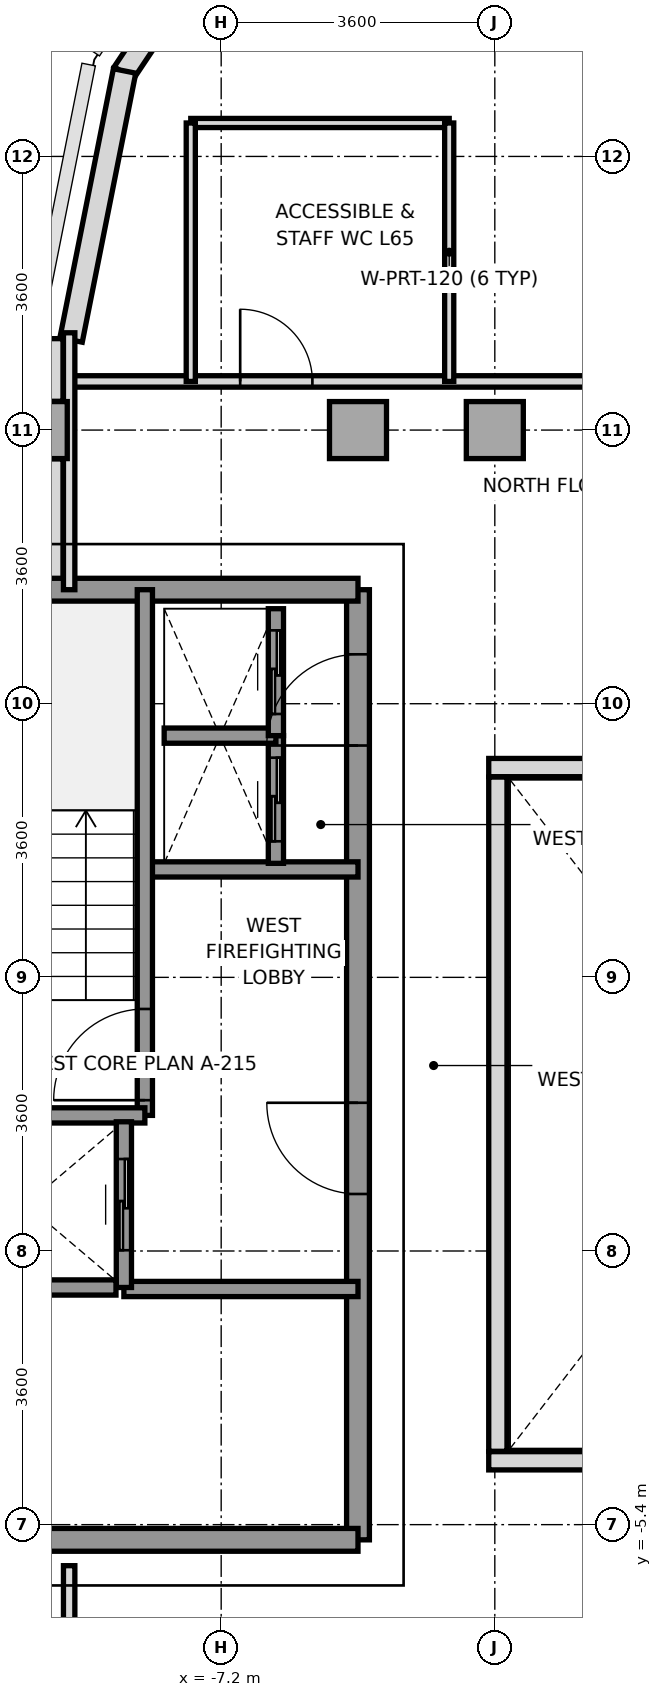
"""IFC4 building model, lengths in metres.
Left out: names, types, materials, properties, quantities, classifications, styles, units other than length and angle.
Written with IfcOpenShell. Run it as: python <this file> out.ifc"""

import sys

from ifc_helpers import new_model, si_unit, direction, frame, frame_2d, origin, origin_2d, place, context, subcontext, project, spatial, rectangle, extrude, source, transform, mapped, element, fill, save


model = new_model("IFC4")
c1 = context("Model", 3, precision=1e-05, world=origin(), true_north=direction((0.0, 1.0)))
c2 = subcontext(c1, "Body", "Model", "MODEL_VIEW")
j1 = project(units=[si_unit("LENGTHUNIT", "METRE"), si_unit("PLANEANGLEUNIT", "RADIAN")], contexts=[c1])
p1 = place(None, origin())
s1 = spatial("IfcSite", under=j1, at=p1, CompositionType="ELEMENT")
p2 = place(p1, origin())
s2 = spatial("IfcBuilding", under=s1, at=p2, CompositionType="ELEMENT")
p3 = place(p2, frame((0.0, 0.0, 236.4)))
s3 = spatial("IfcBuildingStorey", under=s2, at=p3, CompositionType="ELEMENT", Elevation=236.4)
m1 = source(origin(), c2, "Body", "SweptSolid", [
    extrude(rectangle(XDim=0.75, YDim=0.75, at=origin_2d()), origin(), (0.0, 0.0, 1.0), 3.01),
])
for number, where, z_axis, x_axis in (
    (1, (-9.6, 9.0, 0.0), (0.0, 0.0, 1.0), (1.0, 0.0, 0.0)),
    (2, (-5.4, 9.0, 0.0), (0.0, 0.0, 1.0), (1.0, 0.0, 0.0)),
    (3, (-3.6, 9.0, 0.0), (0.0, 0.0, 1.0), (1.0, 0.0, 0.0)),
):
    element("IfcColumn", number, at=place(p3, frame(where, z_axis=z_axis, x_axis=x_axis)), inside=s3, PredefinedType="COLUMN", context=c2, shape_type="MappedRepresentation", body=[
        mapped(m1, transform((0.0, 0.0, 0.0), x_axis=(1.0, 0.0, 0.0), y_axis=(0.0, 1.0, 0.0), z_axis=(0.0, 0.0, 1.0), scale=1.0)),
    ])
p4 = place(p3, frame((-7.305, 15.458, 0.0), z_axis=(0.0, 0.0, 1.0), x_axis=(-0.555604299396, -0.831446848868, 0.0)))
e4 = element("IfcWall", 4, at=p4, inside=s3, PredefinedType="SOLIDWALL", context=c2, shape_type="SweptSolid", body=[
    extrude(rectangle(XDim=2.118, YDim=0.3, at=frame_2d((1.059, 0.0))), origin(), (0.0, 0.0, 1.0), 2.61),
])
p5 = place(p3, frame((-8.471, 13.725, 0.0), z_axis=(0.0, 0.0, 1.0), x_axis=(-0.195114232679, -0.980780523974, 0.0)))
e5 = element("IfcWall", 5, at=p5, inside=s3, PredefinedType="SOLIDWALL", context=c2, shape_type="SweptSolid", body=[
    extrude(rectangle(XDim=3.609, YDim=0.3, at=frame_2d((1.804, 0.0))), origin(), (0.0, 0.0, 1.0), 3.01),
])
p6 = place(p3, frame((-9.4, 6.953, 0.0), z_axis=(0.0, 0.0, 1.0), x_axis=(0.0, 1.0, 0.0)))
e6 = element("IfcWall", 6, at=p6, inside=s3, PredefinedType="PARAPET", context=c2, shape_type="SweptSolid", body=[
    extrude(rectangle(XDim=1.669, YDim=0.24, at=frame_2d((0.834, 0.0))), origin(), (0.0, 0.0, 1.0), 1.15),
])
p7 = place(p3, frame((-9.4, 9.378, 0.0), z_axis=(0.0, 0.0, 1.0), x_axis=(0.0, 1.0, 0.0)))
e7 = element("IfcWall", 7, at=p7, inside=s3, PredefinedType="PARAPET", context=c2, shape_type="SweptSolid", body=[
    extrude(rectangle(XDim=0.825, YDim=0.24, at=frame_2d((0.413, 0.0))), origin(), (0.0, 0.0, 1.0), 1.15),
])
p8 = place(p3, frame((-5.4, -5.6, 0.0), z_axis=(0.0, 0.0, 1.0), x_axis=(0.0, 1.0, 0.0)))
e8 = element("IfcWall", 8, at=p8, inside=s3, PredefinedType="SHEAR", context=c2, shape_type="SweptSolid", body=[
    extrude(rectangle(XDim=12.5, YDim=0.3, at=frame_2d((6.25, 0.0))), origin(), (0.0, 0.0, 1.0), 3.01),
])
p9 = place(p8, frame((4.55, 0.0, 0.0)))
e9 = element("IfcOpeningElement", 9, at=p9, cuts=e8, PredefinedType="OPENING", context=c2, shape_type="SweptSolid", body=[
    extrude(rectangle(XDim=1.2, YDim=2.2, at=frame_2d((0.6, 1.1))), frame((0.0, 0.16, 0.0), z_axis=(0.0, -1.0, 0.0), x_axis=(1.0, 0.0, 0.0)), (0.0, 0.0, 1.0), 0.32),
])
p10 = place(p8, frame((10.45, 0.0, 0.0)))
e10 = element("IfcOpeningElement", 10, at=p10, cuts=e8, PredefinedType="OPENING", context=c2, shape_type="SweptSolid", body=[
    extrude(rectangle(XDim=1.2, YDim=2.2, at=frame_2d((0.6, 1.1))), frame((0.0, 0.16, 0.0), z_axis=(0.0, -1.0, 0.0), x_axis=(1.0, 0.0, 0.0)), (0.0, 0.0, 1.0), 0.32),
])
p11 = place(p3, frame((-11.356, 6.9, 0.0), z_axis=(0.0, 0.0, 1.0), x_axis=(1.0, 0.0, 0.0)))
e11 = element("IfcWall", 11, at=p11, inside=s3, PredefinedType="SHEAR", context=c2, shape_type="SweptSolid", body=[
    extrude(rectangle(XDim=5.956, YDim=0.3, at=frame_2d((2.978, 0.0))), origin(), (0.0, 0.0, 1.0), 3.01),
])
p12 = place(p3, frame((-13.2, -5.6, 0.0), z_axis=(0.0, 0.0, 1.0), x_axis=(1.0, 0.0, 0.0)))
e12 = element("IfcWall", 12, at=p12, inside=s3, PredefinedType="SHEAR", context=c2, shape_type="SweptSolid", body=[
    extrude(rectangle(XDim=7.8, YDim=0.3, at=frame_2d((3.9, 0.0))), origin(), (0.0, 0.0, 1.0), 3.01),
])
p13 = place(p3, frame((-8.18, 3.22, 0.0), z_axis=(0.0, 0.0, 1.0), x_axis=(1.0, 0.0, 0.0)))
e13 = element("IfcWall", 13, at=p13, inside=s3, PredefinedType="SOLIDWALL", context=c2, shape_type="SweptSolid", body=[
    extrude(rectangle(XDim=2.78, YDim=0.2, at=frame_2d((1.39, 0.0))), origin(), (0.0, 0.0, 1.0), 3.01),
])
p14 = place(p3, frame((-8.48, -2.3, 0.0), z_axis=(0.0, 0.0, 1.0), x_axis=(1.0, 0.0, 0.0)))
e14 = element("IfcWall", 14, at=p14, inside=s3, PredefinedType="SOLIDWALL", context=c2, shape_type="SweptSolid", body=[
    extrude(rectangle(XDim=3.08, YDim=0.2, at=frame_2d((1.54, 0.0))), origin(), (0.0, 0.0, 1.0), 3.01),
])
p15 = place(p3, frame((-8.204, -0.016, 0.0), z_axis=(0.0, 0.0, 1.0), x_axis=(0.0, 1.0, 0.0)))
e15 = element("IfcWall", 15, at=p15, inside=s3, PredefinedType="SOLIDWALL", context=c2, shape_type="SweptSolid", body=[
    extrude(rectangle(XDim=6.916, YDim=0.2, at=frame_2d((3.458, 0.0))), origin(), (0.0, 0.0, 1.0), 3.01),
])
p16 = place(p15, frame((0.2, 0.0, 0.0)))
e16 = element("IfcOpeningElement", 16, at=p16, cuts=e15, PredefinedType="OPENING", context=c2, shape_type="SweptSolid", body=[
    extrude(rectangle(XDim=1.2, YDim=2.2, at=frame_2d((0.6, 1.1))), frame((0.0, 0.11, 0.0), z_axis=(0.0, -1.0, 0.0), x_axis=(1.0, 0.0, 0.0)), (0.0, 0.0, 1.0), 0.22),
])
p17 = place(p3, frame((-11.356, -0.016, 0.0), z_axis=(0.0, 0.0, 1.0), x_axis=(1.0, 0.0, 0.0)))
e17 = element("IfcWall", 17, at=p17, inside=s3, PredefinedType="SOLIDWALL", context=c2, shape_type="SweptSolid", body=[
    extrude(rectangle(XDim=3.152, YDim=0.2, at=frame_2d((1.576, 0.0))), origin(), (0.0, 0.0, 1.0), 3.01),
])
p18 = place(p3, frame((-8.48, -2.28, 0.0), z_axis=(0.0, 0.0, 1.0), x_axis=(0.0, 1.0, 0.0)))
e18 = element("IfcWall", 18, at=p18, inside=s3, PredefinedType="SOLIDWALL", context=c2, shape_type="SweptSolid", body=[
    extrude(rectangle(XDim=2.18, YDim=0.2, at=frame_2d((1.09, 0.0))), origin(), (0.0, 0.0, 1.0), 3.01),
])
p19 = place(p18, frame((0.49, 0.0, 0.0)))
e19 = element("IfcOpeningElement", 19, at=p19, cuts=e18, PredefinedType="OPENING", context=c2, shape_type="SweptSolid", body=[
    extrude(rectangle(XDim=1.2, YDim=2.2, at=frame_2d((0.6, 1.1))), frame((0.0, 0.11, 0.0), z_axis=(0.0, -1.0, 0.0), x_axis=(1.0, 0.0, 0.0)), (0.0, 0.0, 1.0), 0.22),
])
p20 = place(p3, frame((-10.946, -2.28, 0.0), z_axis=(0.0, 0.0, 1.0), x_axis=(1.0, 0.0, 0.0)))
e20 = element("IfcWall", 20, at=p20, inside=s3, PredefinedType="SOLIDWALL", context=c2, shape_type="SweptSolid", body=[
    extrude(rectangle(XDim=2.362, YDim=0.2, at=frame_2d((1.181, 0.0))), origin(), (0.0, 0.0, 1.0), 3.01),
])
p21 = place(p3, frame((-6.48, 3.3, 0.0), z_axis=(0.0, 0.0, 1.0), x_axis=(0.0, 1.0, 0.0)))
e21 = element("IfcWall", 21, at=p21, inside=s3, PredefinedType="SOLIDWALL", context=c2, shape_type="SweptSolid", body=[
    extrude(rectangle(XDim=1.68, YDim=0.2, at=frame_2d((0.84, 0.0))), origin(), (0.0, 0.0, 1.0), 3.01),
])
p22 = place(p21, frame((0.29, 0.0, 0.0)))
e22 = element("IfcOpeningElement", 22, at=p22, cuts=e21, PredefinedType="OPENING", context=c2, shape_type="SweptSolid", body=[
    extrude(rectangle(XDim=1.1, YDim=2.2, at=frame_2d((0.55, 1.1))), frame((0.0, 0.11, 0.0), z_axis=(0.0, -1.0, 0.0), x_axis=(1.0, 0.0, 0.0)), (0.0, 0.0, 1.0), 0.22),
])
p23 = place(p3, frame((-7.95, 4.98, 0.0), z_axis=(0.0, 0.0, 1.0), x_axis=(1.0, 0.0, 0.0)))
e23 = element("IfcWall", 23, at=p23, inside=s3, PredefinedType="SOLIDWALL", context=c2, shape_type="SweptSolid", body=[
    extrude(rectangle(XDim=1.47, YDim=0.2, at=frame_2d((0.735, 0.0))), origin(), (0.0, 0.0, 1.0), 3.01),
])
p24 = place(p3, frame((-6.48, 4.98, 0.0), z_axis=(0.0, 0.0, 1.0), x_axis=(0.0, 1.0, 0.0)))
e24 = element("IfcWall", 24, at=p24, inside=s3, PredefinedType="SOLIDWALL", context=c2, shape_type="SweptSolid", body=[
    extrude(rectangle(XDim=1.67, YDim=0.2, at=frame_2d((0.835, 0.0))), origin(), (0.0, 0.0, 1.0), 3.01),
])
p25 = place(p24, frame((0.285, 0.0, 0.0)))
e25 = element("IfcOpeningElement", 25, at=p25, cuts=e24, PredefinedType="OPENING", context=c2, shape_type="SweptSolid", body=[
    extrude(rectangle(XDim=1.1, YDim=2.2, at=frame_2d((0.55, 1.1))), frame((0.0, 0.11, 0.0), z_axis=(0.0, -1.0, 0.0), x_axis=(1.0, 0.0, 0.0)), (0.0, 0.0, 1.0), 0.22),
])
p26 = place(p3, frame((-9.2, 9.64, 0.0), z_axis=(0.0, 0.0, 1.0), x_axis=(1.0, 0.0, 0.0)))
e26 = element("IfcWall", 26, at=p26, inside=s3, PredefinedType="PARTITIONING", context=c2, shape_type="SweptSolid", body=[
    extrude(rectangle(XDim=18.4, YDim=0.15, at=frame_2d((9.2, 0.0))), origin(), (0.0, 0.0, 1.0), 3.01),
])
p27 = place(p26, frame((2.25, 0.0, 0.0)))
e27 = element("IfcOpeningElement", 27, at=p27, cuts=e26, PredefinedType="OPENING", context=c2, shape_type="SweptSolid", body=[
    extrude(rectangle(XDim=0.95, YDim=2.15, at=frame_2d((0.475, 1.075))), frame((0.0, 0.085, 0.0), z_axis=(0.0, -1.0, 0.0), x_axis=(1.0, 0.0, 0.0)), (0.0, 0.0, 1.0), 0.17),
])
p28 = place(p26, frame((9.8, 0.0, 0.0)))
e28 = element("IfcOpeningElement", 28, at=p28, cuts=e26, PredefinedType="OPENING", context=c2, shape_type="SweptSolid", body=[
    extrude(rectangle(XDim=1.1, YDim=2.2, at=frame_2d((0.55, 1.1))), frame((0.0, 0.085, 0.0), z_axis=(0.0, -1.0, 0.0), x_axis=(1.0, 0.0, 0.0)), (0.0, 0.0, 1.0), 0.17),
])
p29 = place(p26, frame((15.15, 0.0, 0.0)))
e29 = element("IfcOpeningElement", 29, at=p29, cuts=e26, PredefinedType="OPENING", context=c2, shape_type="SweptSolid", body=[
    extrude(rectangle(XDim=0.95, YDim=2.15, at=frame_2d((0.475, 1.075))), frame((0.0, 0.085, 0.0), z_axis=(0.0, -1.0, 0.0), x_axis=(1.0, 0.0, 0.0)), (0.0, 0.0, 1.0), 0.17),
])
p30 = place(p3, frame((-9.2, 6.9, 0.0), z_axis=(0.0, 0.0, 1.0), x_axis=(0.0, 1.0, 0.0)))
e30 = element("IfcWall", 30, at=p30, inside=s3, PredefinedType="PARTITIONING", context=c2, shape_type="SweptSolid", body=[
    extrude(rectangle(XDim=3.38, YDim=0.15, at=frame_2d((1.69, 0.0))), origin(), (0.0, 0.0, 1.0), 2.61),
])
for number, where, z_axis, x_axis in (
    (31, (-7.6, 13.04, 0.0), (0.0, 0.0, 1.0), (1.0, 0.0, 0.0)),
    (32, (-7.6, 9.64, 0.0), (0.0, 0.0, 1.0), (0.0, 1.0, 0.0)),
    (33, (-4.2, 9.64, 0.0), (0.0, 0.0, 1.0), (0.0, 1.0, 0.0)),
):
    element("IfcWall", number, at=place(p3, frame(where, z_axis=z_axis, x_axis=x_axis)), inside=s3, PredefinedType="PARTITIONING", context=c2, shape_type="SweptSolid", body=[
        extrude(rectangle(XDim=3.4, YDim=0.12, at=frame_2d((1.7, 0.0))), origin(), (0.0, 0.0, 1.0), 3.01),
    ])
p31 = place(p3, frame((-9.2, -10.28, 0.0), z_axis=(0.0, 0.0, 1.0), x_axis=(0.0, 1.0, 0.0)))
e34 = element("IfcWall", 34, at=p31, inside=s3, PredefinedType="PARTITIONING", context=c2, shape_type="SweptSolid", body=[
    extrude(rectangle(XDim=4.34, YDim=0.15, at=frame_2d((2.17, 0.0))), origin(), (0.0, 0.0, 1.0), 2.61),
])
for number, where, z_axis, x_axis in (
    (35, (-3.68, -4.56, 0.0), (0.0, 0.0, 1.0), (1.0, 0.0, 0.0)),
    (36, (-3.68, 4.56, 0.0), (0.0, 0.0, 1.0), (1.0, 0.0, 0.0)),
):
    element("IfcWall", number, at=place(p3, frame(where, z_axis=z_axis, x_axis=x_axis)), inside=s3, PredefinedType="PARAPET", context=c2, shape_type="SweptSolid", body=[
        extrude(rectangle(XDim=7.36, YDim=0.24, at=frame_2d((3.68, 0.0))), origin(), (0.0, 0.0, 1.0), 1.15),
    ])
p32 = place(p3, frame((-3.56, -4.435, 0.0), z_axis=(0.0, 0.0, 1.0), x_axis=(0.0, 1.0, 0.0)))
e37 = element("IfcWall", 37, at=p32, inside=s3, PredefinedType="PARAPET", context=c2, shape_type="SweptSolid", body=[
    extrude(rectangle(XDim=8.87, YDim=0.24, at=frame_2d((4.435, 0.0))), origin(), (0.0, 0.0, 1.0), 1.15),
])
m2 = source(origin(), c2, "Body", "SweptSolid", [
    extrude(rectangle(XDim=1.2, YDim=2.2, at=frame_2d((0.6, 1.1))), frame((0.0, 0.025, 0.0), z_axis=(0.0, -1.0, 0.0), x_axis=(1.0, 0.0, 0.0)), (0.0, 0.0, 1.0), 0.05),
])
p33 = place(p16, origin())
e38 = element("IfcDoor", 38, at=p33, inside=s3, OperationType="SINGLE_SWING_LEFT", PredefinedType="DOOR", context=c2, shape_type="MappedRepresentation", body=[
    mapped(m2, transform((0.0, 0.0, 0.0), x_axis=(1.0, 0.0, 0.0), y_axis=(0.0, 1.0, 0.0), z_axis=(0.0, 0.0, 1.0), scale=1.0)),
])
fill(e16, e38)
p34 = place(p9, origin())
e39 = element("IfcDoor", 39, at=p34, inside=s3, OperationType="SINGLE_SWING_RIGHT", PredefinedType="DOOR", context=c2, shape_type="MappedRepresentation", body=[
    mapped(m2, transform((0.0, 0.0, 0.0), x_axis=(1.0, 0.0, 0.0), y_axis=(0.0, 1.0, 0.0), z_axis=(0.0, 0.0, 1.0), scale=1.0)),
])
fill(e9, e39)
p35 = place(p10, origin())
e40 = element("IfcDoor", 40, at=p35, inside=s3, OperationType="SINGLE_SWING_LEFT", PredefinedType="DOOR", context=c2, shape_type="MappedRepresentation", body=[
    mapped(m2, transform((0.0, 0.0, 0.0), x_axis=(1.0, 0.0, 0.0), y_axis=(0.0, 1.0, 0.0), z_axis=(0.0, 0.0, 1.0), scale=1.0)),
])
fill(e10, e40)
p36 = place(p19, origin())
e41 = element("IfcDoor", 41, at=p36, inside=s3, OperationType="SLIDING_TO_RIGHT", PredefinedType="DOOR", context=c2, shape_type="MappedRepresentation", body=[
    mapped(m2, transform((0.0, 0.0, 0.0), x_axis=(1.0, 0.0, 0.0), y_axis=(0.0, 1.0, 0.0), z_axis=(0.0, 0.0, 1.0), scale=1.0)),
])
fill(e19, e41)
m3 = source(origin(), c2, "Body", "SweptSolid", [
    extrude(rectangle(XDim=1.1, YDim=2.2, at=frame_2d((0.55, 1.1))), frame((0.0, 0.025, 0.0), z_axis=(0.0, -1.0, 0.0), x_axis=(1.0, 0.0, 0.0)), (0.0, 0.0, 1.0), 0.05),
])
p37 = place(p22, origin())
e42 = element("IfcDoor", 42, at=p37, inside=s3, OperationType="SLIDING_TO_LEFT", PredefinedType="DOOR", context=c2, shape_type="MappedRepresentation", body=[
    mapped(m3, transform((0.0, 0.0, 0.0), x_axis=(1.0, 0.0, 0.0), y_axis=(0.0, 1.0, 0.0), z_axis=(0.0, 0.0, 1.0), scale=1.0)),
])
fill(e22, e42)
p38 = place(p25, origin())
e43 = element("IfcDoor", 43, at=p38, inside=s3, OperationType="SLIDING_TO_LEFT", PredefinedType="DOOR", context=c2, shape_type="MappedRepresentation", body=[
    mapped(m3, transform((0.0, 0.0, 0.0), x_axis=(1.0, 0.0, 0.0), y_axis=(0.0, 1.0, 0.0), z_axis=(0.0, 0.0, 1.0), scale=1.0)),
])
fill(e25, e43)
m4 = source(origin(), c2, "Body", "SweptSolid", [
    extrude(rectangle(XDim=0.95, YDim=2.15, at=frame_2d((0.475, 1.075))), frame((0.0, 0.025, 0.0), z_axis=(0.0, -1.0, 0.0), x_axis=(1.0, 0.0, 0.0)), (0.0, 0.0, 1.0), 0.05),
])
p39 = place(p27, origin())
e44 = element("IfcDoor", 44, at=p39, inside=s3, OperationType="SINGLE_SWING_LEFT", PredefinedType="DOOR", context=c2, shape_type="MappedRepresentation", body=[
    mapped(m4, transform((0.0, 0.0, 0.0), x_axis=(1.0, 0.0, 0.0), y_axis=(0.0, 1.0, 0.0), z_axis=(0.0, 0.0, 1.0), scale=1.0)),
])
fill(e27, e44)
save(model, sys.argv[1])
